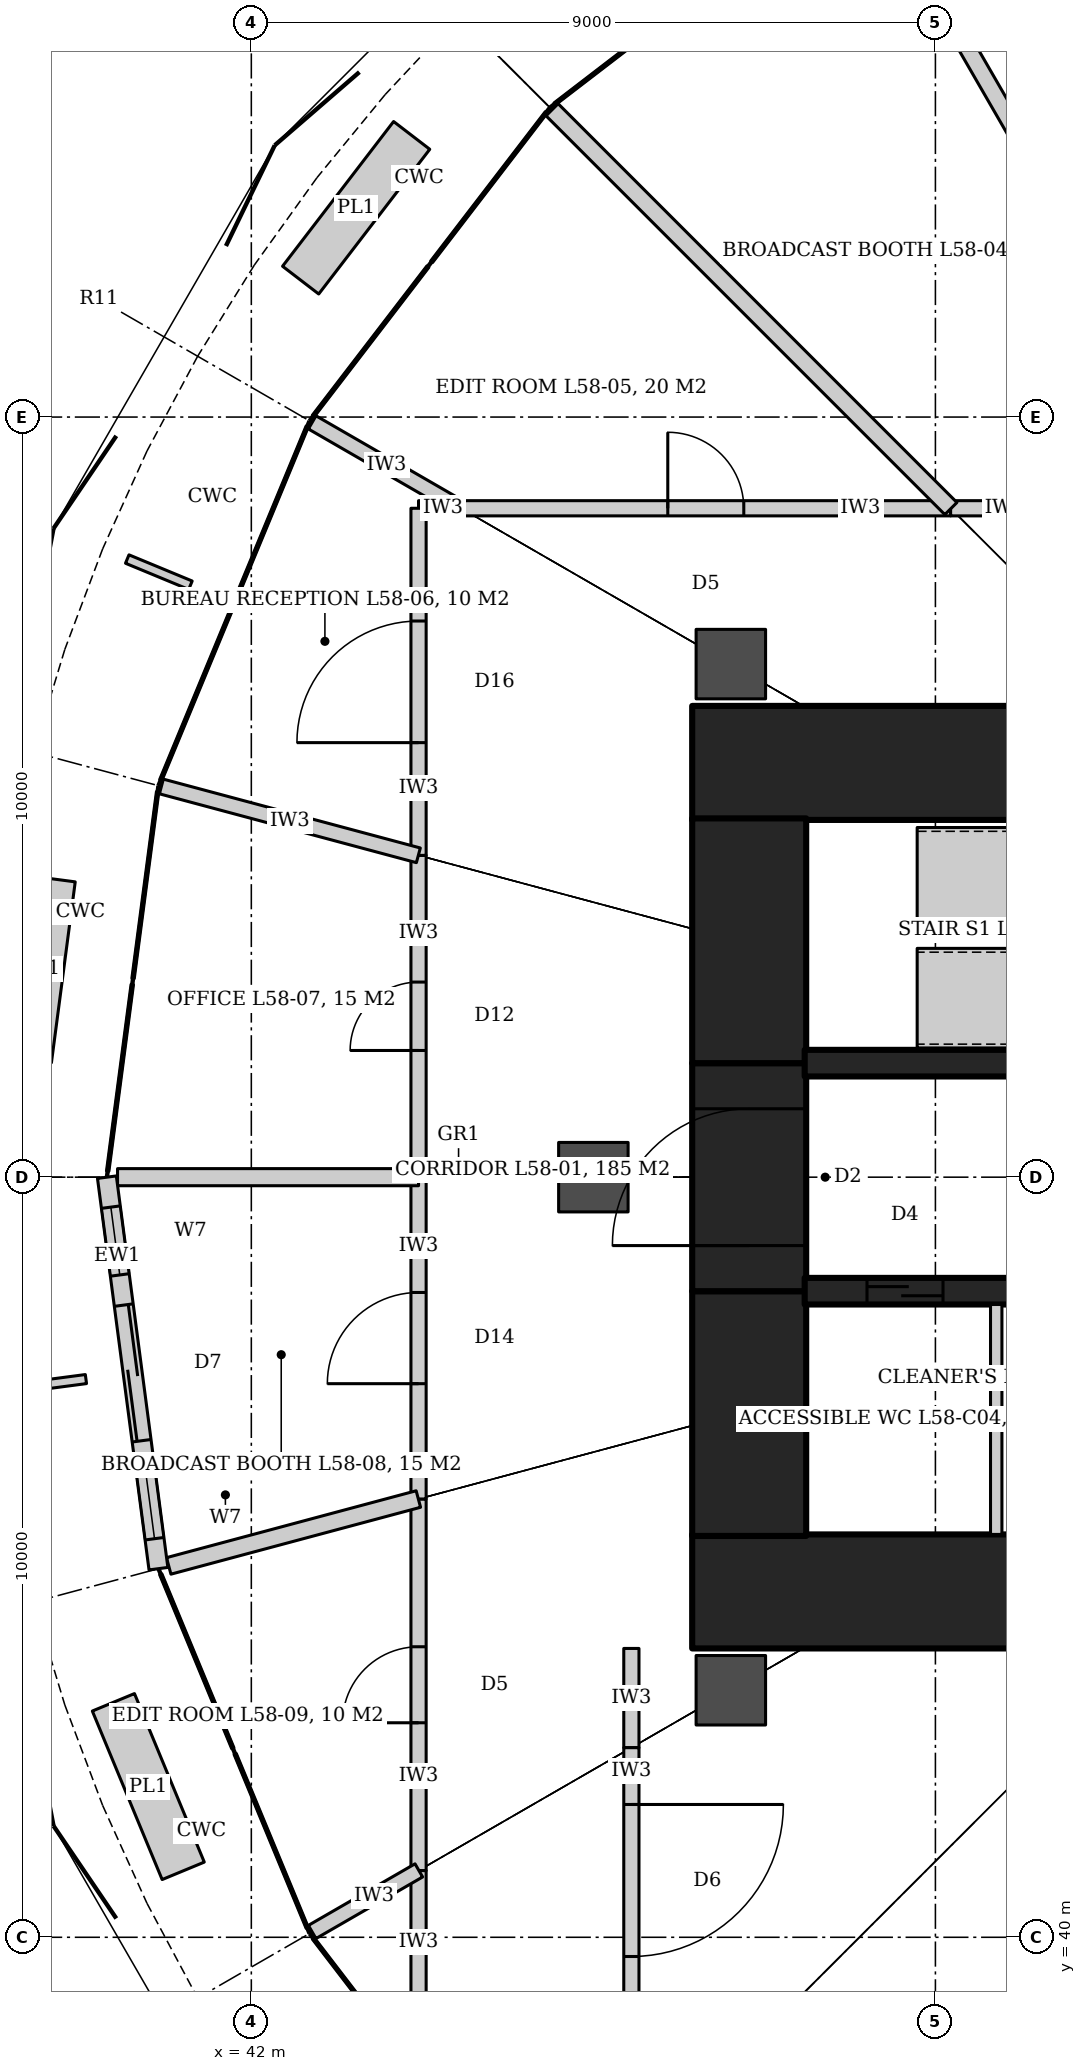
"""IFC4 building model, lengths in metres.
Left out: names, types, materials, properties, quantities, classifications, styles, units other than length and angle.
Written with IfcOpenShell. Run it as: python <this file> out.ifc"""

import sys

from ifc_helpers import new_model, si_unit, direction, frame, frame_2d, origin, origin_2d, place, context, subcontext, project, spatial, rectangle, hollow_circle, extrude, element, fill, save


model = new_model("IFC4")
c1 = context("Model", 3, precision=1e-05, world=origin(), true_north=direction((0.0, 1.0)))
c2 = subcontext(c1, "Body", "Model", "MODEL_VIEW")
j1 = project(units=[si_unit("LENGTHUNIT", "METRE"), si_unit("PLANEANGLEUNIT", "RADIAN")], contexts=[c1])
p1 = place(None, origin())
s1 = spatial("IfcSite", under=j1, at=p1, CompositionType="ELEMENT")
p2 = place(p1, origin())
s2 = spatial("IfcBuilding", under=s1, at=p2, CompositionType="ELEMENT")
p3 = place(p2, frame((0.0, 0.0, 252.8)))
s3 = spatial("IfcBuildingStorey", under=s2, at=p3, CompositionType="ELEMENT", Elevation=252.8)
for number, where, z_axis, x_axis in (
    (1, (47.8, 55.45, 0.0), (0.0, 0.0, 1.0), (1.0, 0.0, 0.0)),
    (2, (47.8, 44.55, 0.0), (0.0, 0.0, 1.0), (1.0, 0.0, 0.0)),
):
    element("IfcWall", number, at=place(p3, frame(where, z_axis=z_axis, x_axis=x_axis)), inside=s3, PredefinedType="SHEAR", context=c2, shape_type="SweptSolid", body=[
        extrude(rectangle(XDim=7.6, YDim=1.5, at=frame_2d((3.8, 0.0))), origin(), (0.0, 0.0, 1.0), 4.2),
    ])
p4 = place(p3, frame((48.55, 45.28, 0.0), z_axis=(0.0, 0.0, 1.0), x_axis=(0.0, 1.0, 0.0)))
e3 = element("IfcWall", 3, at=p4, inside=s3, PredefinedType="SHEAR", context=c2, shape_type="SweptSolid", body=[
    extrude(rectangle(XDim=3.22, YDim=1.5, at=frame_2d((1.61, 0.0))), origin(), (0.0, 0.0, 1.0), 4.2),
])
p5 = place(p3, frame((48.55, 48.5, 0.0), z_axis=(0.0, 0.0, 1.0), x_axis=(0.0, 1.0, 0.0)))
e4 = element("IfcWall", 4, at=p5, inside=s3, PredefinedType="SHEAR", context=c2, shape_type="SweptSolid", body=[
    extrude(rectangle(XDim=3.0, YDim=1.5, at=frame_2d((1.5, 0.0))), origin(), (0.0, 0.0, 1.0), 4.2),
])
p6 = place(p5, frame((0.6, 0.0, 0.0)))
e5 = element("IfcOpeningElement", 5, at=p6, cuts=e4, PredefinedType="OPENING", context=c2, shape_type="SweptSolid", body=[
    extrude(rectangle(XDim=1.8, YDim=2.1, at=frame_2d((0.9, 1.05))), frame((0.0, 0.76, 0.0), z_axis=(0.0, -1.0, 0.0), x_axis=(1.0, 0.0, 0.0)), (0.0, 0.0, 1.0), 1.52),
])
p7 = place(p3, frame((48.55, 51.5, 0.0), z_axis=(0.0, 0.0, 1.0), x_axis=(0.0, 1.0, 0.0)))
e6 = element("IfcWall", 6, at=p7, inside=s3, PredefinedType="SHEAR", context=c2, shape_type="SweptSolid", body=[
    extrude(rectangle(XDim=3.22, YDim=1.5, at=frame_2d((1.61, 0.0))), origin(), (0.0, 0.0, 1.0), 4.2),
])
p8 = place(p3, frame((49.28, 51.5, 0.0), z_axis=(0.0, 0.0, 1.0), x_axis=(1.0, 0.0, 0.0)))
e7 = element("IfcWall", 7, at=p8, inside=s3, PredefinedType="SHEAR", context=c2, shape_type="SweptSolid", body=[
    extrude(rectangle(XDim=6.12, YDim=0.35, at=frame_2d((3.06, 0.0))), origin(), (0.0, 0.0, 1.0), 4.2),
])
p9 = place(p8, frame((4.62, 0.0, 0.0)))
e8 = element("IfcOpeningElement", 8, at=p9, cuts=e7, PredefinedType="OPENING", context=c2, shape_type="SweptSolid", body=[
    extrude(rectangle(XDim=1.0, YDim=2.1, at=frame_2d((0.5, 1.05))), frame((0.0, 0.185, 0.0), z_axis=(0.0, -1.0, 0.0), x_axis=(1.0, 0.0, 0.0)), (0.0, 0.0, 1.0), 0.37),
])
p10 = place(p3, frame((49.28, 48.5, 0.0), z_axis=(0.0, 0.0, 1.0), x_axis=(1.0, 0.0, 0.0)))
e9 = element("IfcWall", 9, at=p10, inside=s3, PredefinedType="SHEAR", context=c2, shape_type="SweptSolid", body=[
    extrude(rectangle(XDim=6.12, YDim=0.35, at=frame_2d((3.06, 0.0))), origin(), (0.0, 0.0, 1.0), 4.2),
])
p11 = place(p10, frame((0.82, 0.0, 0.0)))
e10 = element("IfcOpeningElement", 10, at=p11, cuts=e9, PredefinedType="OPENING", context=c2, shape_type="SweptSolid", body=[
    extrude(rectangle(XDim=1.0, YDim=2.1, at=frame_2d((0.5, 1.05))), frame((0.0, 0.185, 0.0), z_axis=(0.0, -1.0, 0.0), x_axis=(1.0, 0.0, 0.0)), (0.0, 0.0, 1.0), 0.37),
])
p12 = place(p10, frame((2.77, 0.0, 0.0)))
e11 = element("IfcOpeningElement", 11, at=p12, cuts=e9, PredefinedType="OPENING", context=c2, shape_type="SweptSolid", body=[
    extrude(rectangle(XDim=0.9, YDim=2.1, at=frame_2d((0.45, 1.05))), frame((0.0, 0.185, 0.0), z_axis=(0.0, -1.0, 0.0), x_axis=(1.0, 0.0, 0.0)), (0.0, 0.0, 1.0), 0.37),
])
p13 = place(p10, frame((4.47, 0.0, 0.0)))
e12 = element("IfcOpeningElement", 12, at=p13, cuts=e9, PredefinedType="OPENING", context=c2, shape_type="SweptSolid", body=[
    extrude(rectangle(XDim=0.9, YDim=2.1, at=frame_2d((0.45, 1.05))), frame((0.0, 0.185, 0.0), z_axis=(0.0, -1.0, 0.0), x_axis=(1.0, 0.0, 0.0)), (0.0, 0.0, 1.0), 0.37),
])
for number, where, z_axis, x_axis in (
    (13, (48.309, 56.75, 0.0), (0.0, 0.0, 1.0), (1.0, 0.0, 0.0)),
    (14, (46.5, 50.0, 0.0), (0.0, 0.0, 1.0), (1.0, 0.0, 0.0)),
    (15, (48.309, 43.25, 0.0), (0.0, 0.0, 1.0), (1.0, 0.0, 0.0)),
):
    element("IfcColumn", number, at=place(p3, frame(where, z_axis=z_axis, x_axis=x_axis)), inside=s3, PredefinedType="COLUMN", context=c2, shape_type="SweptSolid", body=[
        extrude(hollow_circle(Radius=0.457, WallThickness=0.045, at=origin_2d()), origin(), (0.0, 0.0, 1.0), 4.2),
    ])
p14 = place(p3, frame((44.2, 58.8, 0.0), z_axis=(0.0, 0.0, 1.0), x_axis=(1.0, 0.0, 0.0)))
e16 = element("IfcWall", 16, at=p14, inside=s3, PredefinedType="PARTITIONING", context=c2, shape_type="SweptSolid", body=[
    extrude(rectangle(XDim=0.558, YDim=0.2, at=frame_2d((0.279, 0.0))), origin(), (0.0, 0.0, 1.0), 3.02),
])
p15 = place(p3, frame((44.758, 58.8, 0.0), z_axis=(0.0, 0.0, 1.0), x_axis=(1.0, 0.0, 0.0)))
e17 = element("IfcWall", 17, at=p15, inside=s3, PredefinedType="PARTITIONING", context=c2, shape_type="SweptSolid", body=[
    extrude(rectangle(XDim=6.442, YDim=0.2, at=frame_2d((3.221, 0.0))), origin(), (0.0, 0.0, 1.0), 3.02),
])
p16 = place(p15, frame((2.721, 0.0, 0.0)))
e18 = element("IfcOpeningElement", 18, at=p16, cuts=e17, PredefinedType="OPENING", context=c2, shape_type="SweptSolid", body=[
    extrude(rectangle(XDim=1.0, YDim=2.1, at=frame_2d((0.5, 1.05))), frame((0.0, 0.11, 0.0), z_axis=(0.0, -1.0, 0.0), x_axis=(1.0, 0.0, 0.0)), (0.0, 0.0, 1.0), 0.22),
])
p17 = place(p3, frame((51.2, 58.8, 0.0), z_axis=(0.0, 0.0, 1.0), x_axis=(1.0, 0.0, 0.0)))
e19 = element("IfcWall", 19, at=p17, inside=s3, PredefinedType="PARTITIONING", context=c2, shape_type="SweptSolid", body=[
    extrude(rectangle(XDim=3.719, YDim=0.2, at=frame_2d((1.86, 0.0))), origin(), (0.0, 0.0, 1.0), 3.04),
])
p18 = place(p17, frame((1.26, 0.0, 0.0)))
e20 = element("IfcOpeningElement", 20, at=p18, cuts=e19, PredefinedType="OPENING", context=c2, shape_type="SweptSolid", body=[
    extrude(rectangle(XDim=1.2, YDim=2.4, at=frame_2d((0.6, 1.2))), frame((0.0, 0.11, 0.0), z_axis=(0.0, -1.0, 0.0), x_axis=(1.0, 0.0, 0.0)), (0.0, 0.0, 1.0), 0.22),
])
p19 = place(p3, frame((47.0, 43.8, 0.0), z_axis=(0.0, 0.0, 1.0), x_axis=(0.0, -1.0, 0.0)))
e21 = element("IfcWall", 21, at=p19, inside=s3, PredefinedType="PARTITIONING", context=c2, shape_type="SweptSolid", body=[
    extrude(rectangle(XDim=1.306, YDim=0.2, at=frame_2d((0.653, 0.0))), origin(), (0.0, 0.0, 1.0), 3.02),
])
p20 = place(p3, frame((47.0, 42.494, 0.0), z_axis=(0.0, 0.0, 1.0), x_axis=(0.0, -1.0, 0.0)))
e22 = element("IfcWall", 22, at=p20, inside=s3, PredefinedType="PARTITIONING", context=c2, shape_type="SweptSolid", body=[
    extrude(rectangle(XDim=3.494, YDim=0.2, at=frame_2d((1.747, 0.0))), origin(), (0.0, 0.0, 1.0), 3.02),
])
p21 = place(p20, frame((0.747, 0.0, 0.0)))
e23 = element("IfcOpeningElement", 23, at=p21, cuts=e22, PredefinedType="OPENING", context=c2, shape_type="SweptSolid", body=[
    extrude(rectangle(XDim=2.0, YDim=2.1, at=frame_2d((1.0, 1.05))), frame((0.0, 0.11, 0.0), z_axis=(0.0, -1.0, 0.0), x_axis=(1.0, 0.0, 0.0)), (0.0, 0.0, 1.0), 0.22),
])
p22 = place(p3, frame((44.2, 39.0, 0.0), z_axis=(0.0, 0.0, 1.0), x_axis=(0.0, 1.0, 0.0)))
e24 = element("IfcWall", 24, at=p22, inside=s3, PredefinedType="PARTITIONING", context=c2, shape_type="SweptSolid", body=[
    extrude(rectangle(XDim=1.878, YDim=0.2, at=frame_2d((0.939, 0.0))), origin(), (0.0, 0.0, 1.0), 3.02),
])
p23 = place(p3, frame((44.2, 40.878, 0.0), z_axis=(0.0, 0.0, 1.0), x_axis=(0.0, 1.0, 0.0)))
e25 = element("IfcWall", 25, at=p23, inside=s3, PredefinedType="PARTITIONING", context=c2, shape_type="SweptSolid", body=[
    extrude(rectangle(XDim=4.888, YDim=0.2, at=frame_2d((2.444, 0.0))), origin(), (0.0, 0.0, 1.0), 3.02),
])
p24 = place(p23, frame((1.944, 0.0, 0.0)))
e26 = element("IfcOpeningElement", 26, at=p24, cuts=e25, PredefinedType="OPENING", context=c2, shape_type="SweptSolid", body=[
    extrude(rectangle(XDim=1.0, YDim=2.1, at=frame_2d((0.5, 1.05))), frame((0.0, 0.11, 0.0), z_axis=(0.0, -1.0, 0.0), x_axis=(1.0, 0.0, 0.0)), (0.0, 0.0, 1.0), 0.22),
])
p25 = place(p3, frame((44.2, 45.766, 0.0), z_axis=(0.0, 0.0, 1.0), x_axis=(0.0, 1.0, 0.0)))
e27 = element("IfcWall", 27, at=p25, inside=s3, PredefinedType="PARTITIONING", context=c2, shape_type="SweptSolid", body=[
    extrude(rectangle(XDim=4.234, YDim=0.2, at=frame_2d((2.117, 0.0))), origin(), (0.0, 0.0, 1.0), 3.02),
])
p26 = place(p25, frame((1.517, 0.0, 0.0)))
e28 = element("IfcOpeningElement", 28, at=p26, cuts=e27, PredefinedType="OPENING", context=c2, shape_type="SweptSolid", body=[
    extrude(rectangle(XDim=1.2, YDim=2.4, at=frame_2d((0.6, 1.2))), frame((0.0, 0.11, 0.0), z_axis=(0.0, -1.0, 0.0), x_axis=(1.0, 0.0, 0.0)), (0.0, 0.0, 1.0), 0.22),
])
p27 = place(p3, frame((44.2, 50.0, 0.0), z_axis=(0.0, 0.0, 1.0), x_axis=(0.0, 1.0, 0.0)))
e29 = element("IfcWall", 29, at=p27, inside=s3, PredefinedType="PARTITIONING", context=c2, shape_type="SweptSolid", body=[
    extrude(rectangle(XDim=4.234, YDim=0.2, at=frame_2d((2.117, 0.0))), origin(), (0.0, 0.0, 1.0), 3.02),
])
p28 = place(p27, frame((1.667, 0.0, 0.0)))
e30 = element("IfcOpeningElement", 30, at=p28, cuts=e29, PredefinedType="OPENING", context=c2, shape_type="SweptSolid", body=[
    extrude(rectangle(XDim=0.9, YDim=2.4, at=frame_2d((0.45, 1.2))), frame((0.0, 0.11, 0.0), z_axis=(0.0, -1.0, 0.0), x_axis=(1.0, 0.0, 0.0)), (0.0, 0.0, 1.0), 0.22),
])
p29 = place(p3, frame((44.2, 54.234, 0.0), z_axis=(0.0, 0.0, 1.0), x_axis=(0.0, 1.0, 0.0)))
e31 = element("IfcWall", 31, at=p29, inside=s3, PredefinedType="PARTITIONING", context=c2, shape_type="SweptSolid", body=[
    extrude(rectangle(XDim=4.566, YDim=0.2, at=frame_2d((2.283, 0.0))), origin(), (0.0, 0.0, 1.0), 3.02),
])
p30 = place(p29, frame((1.483, 0.0, 0.0)))
e32 = element("IfcOpeningElement", 32, at=p30, cuts=e31, PredefinedType="OPENING", context=c2, shape_type="SweptSolid", body=[
    extrude(rectangle(XDim=1.6, YDim=2.4, at=frame_2d((0.8, 1.2))), frame((0.0, 0.11, 0.0), z_axis=(0.0, -1.0, 0.0), x_axis=(1.0, 0.0, 0.0)), (0.0, 0.0, 1.0), 0.22),
])
p31 = place(p3, frame((52.879, 62.334, 0.0), z_axis=(0.0, 0.0, 1.0), x_axis=(-0.499985783765, 0.866033611376, 0.0)))
e33 = element("IfcWall", 33, at=p31, inside=s3, PredefinedType="PARTITIONING", context=c2, shape_type="SweptSolid", body=[
    extrude(rectangle(XDim=5.618, YDim=0.225, at=frame_2d((2.809, 0.0))), origin(), (0.0, 0.0, 1.0), 3.02),
])
p32 = place(p3, frame((51.204, 58.796, 0.0), z_axis=(0.0, 0.0, 1.0), x_axis=(-0.707106781187, 0.707106781187, 0.0)))
e34 = element("IfcWall", 34, at=p32, inside=s3, PredefinedType="PARTITIONING", context=c2, shape_type="SweptSolid", body=[
    extrude(rectangle(XDim=7.42, YDim=0.225, at=frame_2d((3.71, 0.0))), origin(), (0.0, 0.0, 1.0), 3.02),
])
p33 = place(p3, frame((44.758, 58.8, 0.0), z_axis=(0.0, 0.0, 1.0), x_axis=(-0.866054268906, 0.49995000081, 0.0)))
e35 = element("IfcWall", 35, at=p33, inside=s3, PredefinedType="PARTITIONING", context=c2, shape_type="SweptSolid", body=[
    extrude(rectangle(XDim=2.26, YDim=0.2, at=frame_2d((1.13, 0.0))), origin(), (0.0, 0.0, 1.0), 3.02),
])
p34 = place(p3, frame((44.198, 54.234, 0.0), z_axis=(0.0, 0.0, 1.0), x_axis=(-0.965935598249, 0.258782572899, 0.0)))
e36 = element("IfcWall", 36, at=p34, inside=s3, PredefinedType="PARTITIONING", context=c2, shape_type="SweptSolid", body=[
    extrude(rectangle(XDim=3.5, YDim=0.2, at=frame_2d((1.75, 0.0))), origin(), (0.0, 0.0, 1.0), 3.02),
])
p35 = place(p3, frame((44.2, 50.0, 0.0), z_axis=(0.0, 0.0, 1.0), x_axis=(-1.0, 0.0, 0.0)))
e37 = element("IfcWall", 37, at=p35, inside=s3, PredefinedType="PARTITIONING", context=c2, shape_type="SweptSolid", body=[
    extrude(rectangle(XDim=3.96, YDim=0.225, at=frame_2d((1.98, 0.0))), origin(), (0.0, 0.0, 1.0), 3.02),
])
p36 = place(p3, frame((44.198, 45.766, 0.0), z_axis=(0.0, 0.0, 1.0), x_axis=(-0.965933949521, -0.258788726886, 0.0)))
e38 = element("IfcWall", 38, at=p36, inside=s3, PredefinedType="PARTITIONING", context=c2, shape_type="SweptSolid", body=[
    extrude(rectangle(XDim=3.4, YDim=0.225, at=frame_2d((1.7, 0.0))), origin(), (0.0, 0.0, 1.0), 3.02),
])
p37 = place(p3, frame((44.204, 40.88, 0.0), z_axis=(0.0, 0.0, 1.0), x_axis=(-0.866055074793, -0.499948604784, 0.0)))
e39 = element("IfcWall", 39, at=p37, inside=s3, PredefinedType="PARTITIONING", context=c2, shape_type="SweptSolid", body=[
    extrude(rectangle(XDim=1.62, YDim=0.2, at=frame_2d((0.81, 0.0))), origin(), (0.0, 0.0, 1.0), 3.02),
])
p38 = place(p3, frame((40.1, 50.0, 0.0), z_axis=(0.0, 0.0, 1.0), x_axis=(0.130510435174, -0.991446935701, 0.0)))
e40 = element("IfcWall", 40, at=p38, inside=s3, PredefinedType="SOLIDWALL", context=c2, shape_type="SweptSolid", body=[
    extrude(rectangle(XDim=5.195, YDim=0.25, at=frame_2d((2.597, 0.0))), origin(), (0.0, 0.0, 1.0), 4.04),
])
p39 = place(p38, frame((1.698, 0.0, 0.0)))
e41 = element("IfcOpeningElement", 41, at=p39, cuts=e40, PredefinedType="OPENING", context=c2, shape_type="SweptSolid", body=[
    extrude(rectangle(XDim=1.8, YDim=2.4, at=frame_2d((0.9, 1.2))), frame((0.0, 0.135, 0.0), z_axis=(0.0, -1.0, 0.0), x_axis=(1.0, 0.0, 0.0)), (0.0, 0.0, 1.0), 0.27),
])
p40 = place(p38, frame((0.397, 0.0, 0.0)))
e42 = element("IfcOpeningElement", 42, at=p40, cuts=e40, PredefinedType="OPENING", context=c2, shape_type="SweptSolid", body=[
    extrude(rectangle(XDim=0.9, YDim=2.4, at=frame_2d((0.45, 1.2))), frame((0.0, 0.135, 0.0), z_axis=(0.0, -1.0, 0.0), x_axis=(1.0, 0.0, 0.0)), (0.0, 0.0, 1.0), 0.27),
])
p41 = place(p38, frame((3.897, 0.0, 0.0)))
e43 = element("IfcOpeningElement", 43, at=p41, cuts=e40, PredefinedType="OPENING", context=c2, shape_type="SweptSolid", body=[
    extrude(rectangle(XDim=0.9, YDim=2.4, at=frame_2d((0.45, 1.2))), frame((0.0, 0.135, 0.0), z_axis=(0.0, -1.0, 0.0), x_axis=(1.0, 0.0, 0.0)), (0.0, 0.0, 1.0), 0.27),
])
p42 = place(p3, frame((51.8, 45.3, 0.0), z_axis=(0.0, 0.0, 1.0), x_axis=(0.0, 1.0, 0.0)))
e44 = element("IfcWall", 44, at=p42, inside=s3, PredefinedType="PARTITIONING", context=c2, shape_type="SweptSolid", body=[
    extrude(rectangle(XDim=3.025, YDim=0.15, at=frame_2d((1.512, 0.0))), origin(), (0.0, 0.0, 1.0), 4.04),
])
p43 = place(p16, origin())
e45 = element("IfcDoor", 45, at=p43, inside=s3, OperationType="SINGLE_SWING_LEFT", PredefinedType="DOOR", context=c2, shape_type="SweptSolid", body=[
    extrude(rectangle(XDim=1.0, YDim=2.1, at=frame_2d((0.5, 1.05))), frame((0.0, 0.025, 0.0), z_axis=(0.0, -1.0, 0.0), x_axis=(1.0, 0.0, 0.0)), (0.0, 0.0, 1.0), 0.05),
])
fill(e18, e45)
p44 = place(p30, origin())
e46 = element("IfcDoor", 46, at=p44, inside=s3, OperationType="DOUBLE_DOOR_DOUBLE_SWING", PredefinedType="DOOR", context=c2, shape_type="SweptSolid", body=[
    extrude(rectangle(XDim=1.6, YDim=2.4, at=frame_2d((0.8, 1.2))), frame((0.0, 0.025, 0.0), z_axis=(0.0, -1.0, 0.0), x_axis=(1.0, 0.0, 0.0)), (0.0, 0.0, 1.0), 0.05),
])
fill(e32, e46)
p45 = place(p28, origin())
e47 = element("IfcDoor", 47, at=p45, inside=s3, OperationType="SINGLE_SWING_LEFT", PredefinedType="DOOR", context=c2, shape_type="SweptSolid", body=[
    extrude(rectangle(XDim=0.9, YDim=2.4, at=frame_2d((0.45, 1.2))), frame((0.0, 0.025, 0.0), z_axis=(0.0, -1.0, 0.0), x_axis=(1.0, 0.0, 0.0)), (0.0, 0.0, 1.0), 0.05),
])
fill(e30, e47)
p46 = place(p26, origin())
e48 = element("IfcDoor", 48, at=p46, inside=s3, OperationType="SINGLE_SWING_LEFT", PredefinedType="DOOR", context=c2, shape_type="SweptSolid", body=[
    extrude(rectangle(XDim=1.2, YDim=2.4, at=frame_2d((0.6, 1.2))), frame((0.0, 0.025, 0.0), z_axis=(0.0, -1.0, 0.0), x_axis=(1.0, 0.0, 0.0)), (0.0, 0.0, 1.0), 0.05),
])
fill(e28, e48)
p47 = place(p24, origin())
e49 = element("IfcDoor", 49, at=p47, inside=s3, OperationType="SINGLE_SWING_LEFT", PredefinedType="DOOR", context=c2, shape_type="SweptSolid", body=[
    extrude(rectangle(XDim=1.0, YDim=2.1, at=frame_2d((0.5, 1.05))), frame((0.0, 0.025, 0.0), z_axis=(0.0, -1.0, 0.0), x_axis=(1.0, 0.0, 0.0)), (0.0, 0.0, 1.0), 0.05),
])
fill(e26, e49)
p48 = place(p21, origin())
e50 = element("IfcDoor", 50, at=p48, inside=s3, OperationType="DOUBLE_DOOR_DOUBLE_SWING", PredefinedType="DOOR", context=c2, shape_type="SweptSolid", body=[
    extrude(rectangle(XDim=2.0, YDim=2.1, at=frame_2d((1.0, 1.05))), frame((0.0, 0.025, 0.0), z_axis=(0.0, -1.0, 0.0), x_axis=(1.0, 0.0, 0.0)), (0.0, 0.0, 1.0), 0.05),
])
fill(e23, e50)
p49 = place(p39, origin())
e51 = element("IfcDoor", 51, at=p49, inside=s3, OperationType="DOUBLE_DOOR_SLIDING", PredefinedType="DOOR", context=c2, shape_type="SweptSolid", body=[
    extrude(rectangle(XDim=1.8, YDim=2.4, at=frame_2d((0.9, 1.2))), frame((0.0, 0.025, 0.0), z_axis=(0.0, -1.0, 0.0), x_axis=(1.0, 0.0, 0.0)), (0.0, 0.0, 1.0), 0.05),
])
fill(e41, e51)
p50 = place(p40, origin())
e52 = element("IfcWindow", 52, at=p50, inside=s3, PartitioningType="SINGLE_PANEL", PredefinedType="WINDOW", context=c2, shape_type="SweptSolid", body=[
    extrude(rectangle(XDim=0.9, YDim=2.4, at=frame_2d((0.45, 1.2))), frame((0.0, 0.03, 0.0), z_axis=(0.0, -1.0, 0.0), x_axis=(1.0, 0.0, 0.0)), (0.0, 0.0, 1.0), 0.06),
])
fill(e42, e52)
p51 = place(p41, origin())
e53 = element("IfcWindow", 53, at=p51, inside=s3, PartitioningType="SINGLE_PANEL", PredefinedType="WINDOW", context=c2, shape_type="SweptSolid", body=[
    extrude(rectangle(XDim=0.9, YDim=2.4, at=frame_2d((0.45, 1.2))), frame((0.0, 0.03, 0.0), z_axis=(0.0, -1.0, 0.0), x_axis=(1.0, 0.0, 0.0)), (0.0, 0.0, 1.0), 0.06),
])
fill(e43, e53)
p52 = place(p11, origin())
e54 = element("IfcDoor", 54, at=p52, inside=s3, OperationType="SLIDING_TO_LEFT", PredefinedType="DOOR", context=c2, shape_type="SweptSolid", body=[
    extrude(rectangle(XDim=1.0, YDim=2.1, at=frame_2d((0.5, 1.05))), frame((0.0, 0.025, 0.0), z_axis=(0.0, -1.0, 0.0), x_axis=(1.0, 0.0, 0.0)), (0.0, 0.0, 1.0), 0.05),
])
fill(e10, e54)
p53 = place(p6, origin())
e55 = element("IfcDoor", 55, at=p53, inside=s3, OperationType="DOUBLE_DOOR_DOUBLE_SWING", PredefinedType="DOOR", context=c2, shape_type="SweptSolid", body=[
    extrude(rectangle(XDim=1.8, YDim=2.1, at=frame_2d((0.9, 1.05))), frame((0.0, 0.025, 0.0), z_axis=(0.0, -1.0, 0.0), x_axis=(1.0, 0.0, 0.0)), (0.0, 0.0, 1.0), 0.05),
])
fill(e5, e55)
save(model, sys.argv[1])
